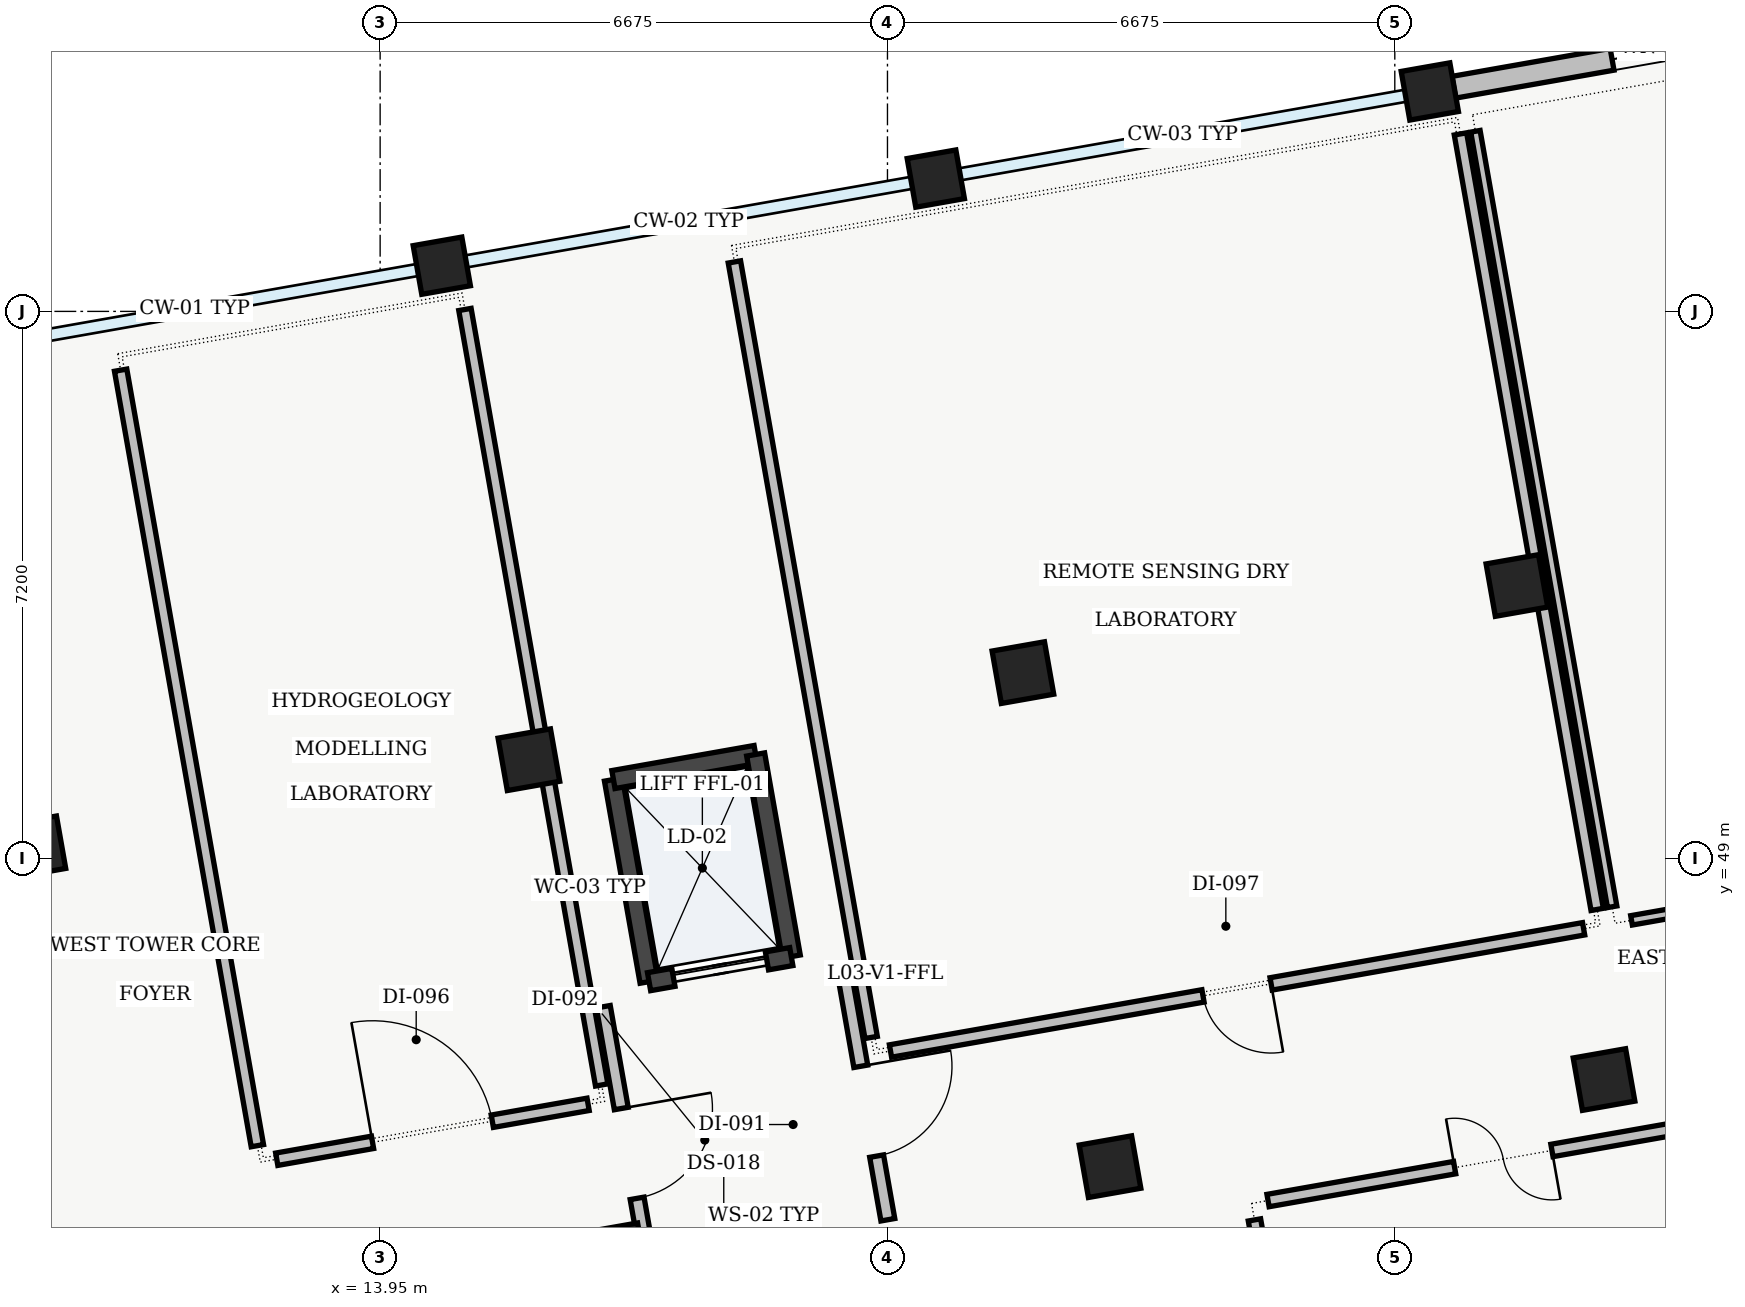
"""IFC4 building model, lengths in metres.
Left out: names, types, materials, properties, quantities, classifications, styles, units other than length and angle.
Written with IfcOpenShell. Run it as: python <this file> out.ifc"""

import sys

from ifc_helpers import new_model, si_unit, direction, frame, frame_2d, origin, origin_2d, place, context, subcontext, project, spatial, rectangle, extrude, element, fill, save


model = new_model("IFC4")
c1 = context("Model", 3, precision=1e-05, world=origin(), true_north=direction((0.0, 1.0)))
c2 = subcontext(c1, "Body", "Model", "MODEL_VIEW")
j1 = project(units=[si_unit("LENGTHUNIT", "METRE"), si_unit("PLANEANGLEUNIT", "RADIAN")], contexts=[c1])
p1 = place(None, origin())
s1 = spatial("IfcSite", under=j1, at=p1, CompositionType="ELEMENT")
p2 = place(p1, origin())
s2 = spatial("IfcBuilding", under=s1, at=p2, CompositionType="ELEMENT")
p3 = place(p2, frame((0.0, 0.0, 14.1)))
s3 = spatial("IfcBuildingStorey", under=s2, at=p3, CompositionType="ELEMENT", Elevation=14.1)
for number, where, z_axis, x_axis in (
    (1, (9.407, 49.156, 0.0), (0.0, 0.0, 1.0), (0.985, 0.174, 0.0)),
    (2, (17.053, 43.802, 0.0), (0.0, 0.0, 1.0), (0.985, 0.174, 0.0)),
    (3, (15.907, 50.302, 0.0), (0.0, 0.0, 1.0), (0.985, 0.174, 0.0)),
):
    element("IfcColumn", number, at=place(p3, frame(where, z_axis=z_axis, x_axis=x_axis)), inside=s3, PredefinedType="COLUMN", context=c2, shape_type="SweptSolid", body=[
        extrude(rectangle(XDim=0.7, YDim=0.7, at=origin_2d()), origin(), (0.0, 0.0, 1.0), 4.31),
    ])
p4 = place(p3, frame((14.761, 56.801, 0.0), z_axis=(0.0, 0.0, 1.0), x_axis=(0.984807753012, 0.173648177667, 0.0)))
e4 = element("IfcColumn", 4, at=p4, inside=s3, PredefinedType="COLUMN", context=c2, shape_type="SweptSolid", body=[
    extrude(rectangle(XDim=0.65, YDim=0.65, at=origin_2d()), origin(), (0.0, 0.0, 1.0), 4.31),
])
for number, where, z_axis, x_axis in (
    (5, (23.553, 44.948, 0.0), (0.0, 0.0, 1.0), (0.985, 0.174, 0.0)),
    (6, (22.407, 51.448, 0.0), (0.0, 0.0, 1.0), (0.985, 0.174, 0.0)),
):
    element("IfcColumn", number, at=place(p3, frame(where, z_axis=z_axis, x_axis=x_axis)), inside=s3, PredefinedType="COLUMN", context=c2, shape_type="SweptSolid", body=[
        extrude(rectangle(XDim=0.7, YDim=0.7, at=origin_2d()), origin(), (0.0, 0.0, 1.0), 4.31),
    ])
p5 = place(p3, frame((21.261, 57.948, 0.0), z_axis=(0.0, 0.0, 1.0), x_axis=(0.984807753012, 0.173648177667, 0.0)))
e7 = element("IfcColumn", 7, at=p5, inside=s3, PredefinedType="COLUMN", context=c2, shape_type="SweptSolid", body=[
    extrude(rectangle(XDim=0.65, YDim=0.65, at=origin_2d()), origin(), (0.0, 0.0, 1.0), 4.31),
])
for number, where, z_axis, x_axis in (
    (8, (30.053, 46.094, 0.0), (0.0, 0.0, 1.0), (0.985, 0.174, 0.0)),
    (9, (28.907, 52.594, 0.0), (0.0, 0.0, 1.0), (0.985, 0.174, 0.0)),
):
    element("IfcColumn", number, at=place(p3, frame(where, z_axis=z_axis, x_axis=x_axis)), inside=s3, PredefinedType="COLUMN", context=c2, shape_type="SweptSolid", body=[
        extrude(rectangle(XDim=0.7, YDim=0.7, at=origin_2d()), origin(), (0.0, 0.0, 1.0), 4.31),
    ])
p6 = place(p3, frame((27.761, 59.094, 0.0), z_axis=(0.0, 0.0, 1.0), x_axis=(0.984807753012, 0.173648177667, 0.0)))
e10 = element("IfcColumn", 10, at=p6, inside=s3, PredefinedType="COLUMN", context=c2, shape_type="SweptSolid", body=[
    extrude(rectangle(XDim=0.65, YDim=0.65, at=origin_2d()), origin(), (0.0, 0.0, 1.0), 4.31),
])
p7 = place(p3, frame((28.076, 59.149, 0.0), z_axis=(0.0, 0.0, 1.0), x_axis=(0.98480829201, 0.173645120828, 0.0)))
e11 = element("IfcWall", 11, at=p7, inside=s3, PredefinedType="STANDARD", context=c2, shape_type="SweptSolid", body=[
    extrude(rectangle(XDim=5.96, YDim=0.29, at=frame_2d((2.98, 0.0))), origin(), (0.0, 0.0, 1.0), 3.795),
])
p8 = place(p7, frame((2.115, 0.0, 0.95)))
e12 = element("IfcOpeningElement", 12, at=p8, cuts=e11, PredefinedType="OPENING", context=c2, shape_type="SweptSolid", body=[
    extrude(rectangle(XDim=1.73, YDim=1.36, at=frame_2d((0.865, 0.68))), frame((0.0, 0.145, 0.0), z_axis=(0.0, -1.0, 0.0), x_axis=(1.0, 0.0, 0.0)), (0.0, 0.0, 1.0), 0.29),
])
p9 = place(p3, frame((17.488, 47.382, 0.0), z_axis=(0.0, 0.0, 1.0), x_axis=(-0.173615102578, 0.98481358447, 0.0)))
e13 = element("IfcWall", 13, at=p9, inside=s3, PredefinedType="SHEAR", context=c2, shape_type="SweptSolid", body=[
    extrude(rectangle(XDim=2.7, YDim=0.24, at=frame_2d((1.35, 0.0))), origin(), (0.0, 0.0, 1.0), 4.28),
])
p10 = place(p3, frame((17.02, 50.041, 0.0), z_axis=(0.0, 0.0, 1.0), x_axis=(0.984815882103, 0.173602068988, 0.0)))
e14 = element("IfcWall", 14, at=p10, inside=s3, PredefinedType="SHEAR", context=c2, shape_type="SweptSolid", body=[
    extrude(rectangle(XDim=1.9, YDim=0.24, at=frame_2d((0.95, 0.0))), origin(), (0.0, 0.0, 1.0), 4.28),
])
p11 = place(p3, frame((18.891, 50.371, 0.0), z_axis=(0.0, 0.0, 1.0), x_axis=(0.173615102578, -0.98481358447, 0.0)))
e15 = element("IfcWall", 15, at=p11, inside=s3, PredefinedType="SHEAR", context=c2, shape_type="SweptSolid", body=[
    extrude(rectangle(XDim=2.7, YDim=0.24, at=frame_2d((1.35, 0.0))), origin(), (0.0, 0.0, 1.0), 4.28),
])
p12 = place(p3, frame((19.359, 47.712, 0.0), z_axis=(0.0, 0.0, 1.0), x_axis=(-0.984815882103, -0.173602068988, 0.0)))
e16 = element("IfcWall", 16, at=p12, inside=s3, PredefinedType="SHEAR", context=c2, shape_type="SweptSolid", body=[
    extrude(rectangle(XDim=1.9, YDim=0.24, at=frame_2d((0.95, 0.0))), origin(), (0.0, 0.0, 1.0), 4.28),
])
p13 = place(p12, frame((0.325, 0.0, 0.0)))
e17 = element("IfcOpeningElement", 17, at=p13, cuts=e16, PredefinedType="OPENING", context=c2, shape_type="SweptSolid", body=[
    extrude(rectangle(XDim=1.25, YDim=2.2, at=frame_2d((0.625, 1.1))), frame((0.0, 0.12, 0.0), z_axis=(0.0, -1.0, 0.0), x_axis=(1.0, 0.0, 0.0)), (0.0, 0.0, 1.0), 0.24),
])
p14 = place(p3, frame((20.63, 44.25, 0.0), z_axis=(0.0, 0.0, 1.0), x_axis=(-0.173621956536, 0.984812376145, 0.0)))
e18 = element("IfcWall", 18, at=p14, inside=s3, PredefinedType="SOLIDWALL", context=c2, shape_type="SweptSolid", body=[
    extrude(rectangle(XDim=3.41, YDim=0.185, at=frame_2d((1.705, 0.0))), origin(), (0.0, 0.0, 1.0), 3.95),
])
p15 = place(p14, frame((0.85, 0.0, 0.0)))
e19 = element("IfcOpeningElement", 19, at=p15, cuts=e18, PredefinedType="OPENING", context=c2, shape_type="SweptSolid", body=[
    extrude(rectangle(XDim=1.2, YDim=2.15, at=frame_2d((0.6, 1.075))), frame((0.0, 0.093, 0.0), z_axis=(0.0, -1.0, 0.0), x_axis=(1.0, 0.0, 0.0)), (0.0, 0.0, 1.0), 0.185),
])
p16 = place(p3, frame((16.886, 47.052, 0.0), z_axis=(0.0, 0.0, 1.0), x_axis=(0.173621956536, -0.984812376145, 0.0)))
e20 = element("IfcWall", 20, at=p16, inside=s3, PredefinedType="SOLIDWALL", context=c2, shape_type="SweptSolid", body=[
    extrude(rectangle(XDim=3.41, YDim=0.185, at=frame_2d((1.705, 0.0))), origin(), (0.0, 0.0, 1.0), 3.95),
])
p17 = place(p16, frame((1.36, 0.0, 0.0)))
e21 = element("IfcOpeningElement", 21, at=p17, cuts=e20, PredefinedType="OPENING", context=c2, shape_type="SweptSolid", body=[
    extrude(rectangle(XDim=1.2, YDim=2.15, at=frame_2d((0.6, 1.075))), frame((0.0, 0.093, 0.0), z_axis=(0.0, -1.0, 0.0), x_axis=(1.0, 0.0, 0.0)), (0.0, 0.0, 1.0), 0.185),
])
p18 = place(p3, frame((12.59, 45.046, 0.0), z_axis=(0.0, 0.0, 1.0), x_axis=(0.984805411783, 0.173661454915, 0.0)))
e22 = element("IfcWall", 22, at=p18, inside=s3, PredefinedType="PARTITIONING", context=c2, shape_type="SweptSolid", body=[
    extrude(rectangle(XDim=4.16, YDim=0.165, at=frame_2d((2.08, 0.0))), origin(), (0.0, 0.0, 1.0), 3.895),
])
p19 = place(p18, frame((1.28, 0.0, 0.0)))
e23 = element("IfcOpeningElement", 23, at=p19, cuts=e22, PredefinedType="OPENING", context=c2, shape_type="SweptSolid", body=[
    extrude(rectangle(XDim=1.6, YDim=2.06, at=frame_2d((0.8, 1.03))), frame((0.0, 0.083, 0.0), z_axis=(0.0, -1.0, 0.0), x_axis=(1.0, 0.0, 0.0)), (0.0, 0.0, 1.0), 0.165),
])
p20 = place(p3, frame((16.865, 46.023, 0.0), z_axis=(0.0, 0.0, 1.0), x_axis=(-0.173632075677, 0.984810592092, 0.0)))
e24 = element("IfcWall", 24, at=p20, inside=s3, PredefinedType="PARTITIONING", context=c2, shape_type="SweptSolid", body=[
    extrude(rectangle(XDim=10.36, YDim=0.165, at=frame_2d((5.18, 0.0))), origin(), (0.0, 0.0, 1.0), 3.695),
])
p21 = place(p3, frame((10.536, 55.427, 0.0), z_axis=(0.0, 0.0, 1.0), x_axis=(0.173654930775, -0.984806562233, 0.0)))
e25 = element("IfcWall", 25, at=p21, inside=s3, PredefinedType="PARTITIONING", context=c2, shape_type="SweptSolid", body=[
    extrude(rectangle(XDim=10.36, YDim=0.165, at=frame_2d((5.18, 0.0))), origin(), (0.0, 0.0, 1.0), 3.95),
])
p22 = place(p3, frame((20.665, 46.469, 0.0), z_axis=(0.0, 0.0, 1.0), x_axis=(0.984804784872, 0.173665009985, 0.0)))
e26 = element("IfcWall", 26, at=p22, inside=s3, PredefinedType="PARTITIONING", context=c2, shape_type="SweptSolid", body=[
    extrude(rectangle(XDim=9.26, YDim=0.165, at=frame_2d((4.63, 0.0))), origin(), (0.0, 0.0, 1.0), 3.895),
])
p23 = place(p22, frame((4.175, 0.0, 0.0)))
e27 = element("IfcOpeningElement", 27, at=p23, cuts=e26, PredefinedType="OPENING", context=c2, shape_type="SweptSolid", body=[
    extrude(rectangle(XDim=0.91, YDim=2.08, at=frame_2d((0.455, 1.04))), frame((0.0, 0.083, 0.0), z_axis=(0.0, -1.0, 0.0), x_axis=(1.0, 0.0, 0.0)), (0.0, 0.0, 1.0), 0.165),
])
p24 = place(p3, frame((29.963, 48.333, 0.0), z_axis=(0.0, 0.0, 1.0), x_axis=(-0.173658960975, 0.984805851563, 0.0)))
e28 = element("IfcWall", 28, at=p24, inside=s3, PredefinedType="PARTITIONING", context=c2, shape_type="SweptSolid", body=[
    extrude(rectangle(XDim=10.36, YDim=0.165, at=frame_2d((5.18, 0.0))), origin(), (0.0, 0.0, 1.0), 3.695),
])
p25 = place(p3, frame((18.611, 56.851, 0.0), z_axis=(0.0, 0.0, 1.0), x_axis=(0.173654930775, -0.984806562233, 0.0)))
e29 = element("IfcWall", 29, at=p25, inside=s3, PredefinedType="PARTITIONING", context=c2, shape_type="SweptSolid", body=[
    extrude(rectangle(XDim=10.36, YDim=0.165, at=frame_2d((5.18, 0.0))), origin(), (0.0, 0.0, 1.0), 3.95),
])
p26 = place(p3, frame((30.415, 48.189, 0.0), z_axis=(0.0, 0.0, 1.0), x_axis=(0.984810073067, 0.173635019467, 0.0)))
e30 = element("IfcWall", 30, at=p26, inside=s3, PredefinedType="PARTITIONING", context=c2, shape_type="SweptSolid", body=[
    extrude(rectangle(XDim=11.86, YDim=0.125, at=frame_2d((5.93, 0.0))), origin(), (0.0, 0.0, 1.0), 3.95),
])
p27 = place(p26, frame((5.46, 0.0, 0.0)))
e31 = element("IfcOpeningElement", 31, at=p27, cuts=e30, PredefinedType="OPENING", context=c2, shape_type="SweptSolid", body=[
    extrude(rectangle(XDim=0.94, YDim=2.12, at=frame_2d((0.47, 1.06))), frame((0.0, 0.062, 0.0), z_axis=(0.0, -1.0, 0.0), x_axis=(1.0, 0.0, 0.0)), (0.0, 0.0, 1.0), 0.125),
])
p28 = place(p3, frame((28.361, 58.57, 0.0), z_axis=(0.0, 0.0, 1.0), x_axis=(0.173632075677, -0.984810592092, 0.0)))
e32 = element("IfcWall", 32, at=p28, inside=s3, PredefinedType="PARTITIONING", context=c2, shape_type="SweptSolid", body=[
    extrude(rectangle(XDim=10.36, YDim=0.125, at=frame_2d((5.18, 0.0))), origin(), (0.0, 0.0, 1.0), 3.95),
])
p29 = place(p3, frame((35.096, 46.171, 0.0), z_axis=(0.0, 0.0, 1.0), x_axis=(-0.98480912325, -0.173640406486, 0.0)))
e33 = element("IfcWall", 33, at=p29, inside=s3, PredefinedType="PARTITIONING", context=c2, shape_type="SweptSolid", body=[
    extrude(rectangle(XDim=9.61, YDim=0.165, at=frame_2d((4.805, 0.0))), origin(), (0.0, 0.0, 1.0), 3.95),
])
p30 = place(p29, frame((5.817, 0.0, 0.0)))
e34 = element("IfcOpeningElement", 34, at=p30, cuts=e33, PredefinedType="OPENING", context=c2, shape_type="SweptSolid", body=[
    extrude(rectangle(XDim=1.3, YDim=2.18, at=frame_2d((0.65, 1.09))), frame((0.0, 0.083, 0.0), z_axis=(0.0, -1.0, 0.0), x_axis=(1.0, 0.0, 0.0)), (0.0, 0.0, 1.0), 0.165),
])
p31 = place(p3, frame((25.454, 44.247, 0.0), z_axis=(0.0, 0.0, 1.0), x_axis=(0.173658971256, -0.98480584975, 0.0)))
e35 = element("IfcWall", 35, at=p31, inside=s3, PredefinedType="PARTITIONING", context=c2, shape_type="SweptSolid", body=[
    extrude(rectangle(XDim=4.96, YDim=0.165, at=frame_2d((2.48, 0.0))), origin(), (0.0, 0.0, 1.0), 3.95),
])
p32 = place(p8, origin())
e36 = element("IfcWindow", 36, at=p32, inside=s3, PartitioningType="SINGLE_PANEL", PredefinedType="WINDOW", context=c2, shape_type="SweptSolid", body=[
    extrude(rectangle(XDim=1.73, YDim=1.36, at=frame_2d((0.865, 0.68))), frame((0.0, 0.03, 0.0), z_axis=(0.0, -1.0, 0.0), x_axis=(1.0, 0.0, 0.0)), (0.0, 0.0, 1.0), 0.06),
])
fill(e12, e36)
p33 = place(p13, origin())
e37 = element("IfcDoor", 37, at=p33, inside=s3, OperationType="SLIDING_TO_RIGHT", PredefinedType="DOOR", context=c2, shape_type="SweptSolid", body=[
    extrude(rectangle(XDim=1.25, YDim=2.2, at=frame_2d((0.625, 1.1))), frame((0.0, 0.025, 0.0), z_axis=(0.0, -1.0, 0.0), x_axis=(1.0, 0.0, 0.0)), (0.0, 0.0, 1.0), 0.05),
])
fill(e17, e37)
p34 = place(p15, origin())
e38 = element("IfcDoor", 38, at=p34, inside=s3, OperationType="SINGLE_SWING_RIGHT", PredefinedType="DOOR", context=c2, shape_type="SweptSolid", body=[
    extrude(rectangle(XDim=1.2, YDim=2.15, at=frame_2d((0.6, 1.075))), frame((0.0, 0.025, 0.0), z_axis=(0.0, -1.0, 0.0), x_axis=(1.0, 0.0, 0.0)), (0.0, 0.0, 1.0), 0.05),
])
fill(e19, e38)
p35 = place(p17, origin())
e39 = element("IfcDoor", 39, at=p35, inside=s3, OperationType="SINGLE_SWING_LEFT", PredefinedType="DOOR", context=c2, shape_type="SweptSolid", body=[
    extrude(rectangle(XDim=1.2, YDim=2.15, at=frame_2d((0.6, 1.075))), frame((0.0, 0.025, 0.0), z_axis=(0.0, -1.0, 0.0), x_axis=(1.0, 0.0, 0.0)), (0.0, 0.0, 1.0), 0.05),
])
fill(e21, e39)
p36 = place(p19, origin())
e40 = element("IfcDoor", 40, at=p36, inside=s3, OperationType="SINGLE_SWING_LEFT", PredefinedType="DOOR", context=c2, shape_type="SweptSolid", body=[
    extrude(rectangle(XDim=1.6, YDim=2.06, at=frame_2d((0.8, 1.03))), frame((0.0, 0.025, 0.0), z_axis=(0.0, -1.0, 0.0), x_axis=(1.0, 0.0, 0.0)), (0.0, 0.0, 1.0), 0.05),
])
fill(e23, e40)
p37 = place(p23, origin())
e41 = element("IfcDoor", 41, at=p37, inside=s3, OperationType="SINGLE_SWING_RIGHT", PredefinedType="DOOR", context=c2, shape_type="SweptSolid", body=[
    extrude(rectangle(XDim=0.91, YDim=2.08, at=frame_2d((0.455, 1.04))), frame((0.0, 0.025, 0.0), z_axis=(0.0, -1.0, 0.0), x_axis=(1.0, 0.0, 0.0)), (0.0, 0.0, 1.0), 0.05),
])
fill(e27, e41)
p38 = place(p30, origin())
e42 = element("IfcDoor", 42, at=p38, inside=s3, OperationType="DOUBLE_DOOR_SINGLE_SWING", PredefinedType="DOOR", context=c2, shape_type="SweptSolid", body=[
    extrude(rectangle(XDim=1.3, YDim=2.18, at=frame_2d((0.65, 1.09))), frame((0.0, 0.025, 0.0), z_axis=(0.0, -1.0, 0.0), x_axis=(1.0, 0.0, 0.0)), (0.0, 0.0, 1.0), 0.05),
])
fill(e34, e42)
save(model, sys.argv[1])
